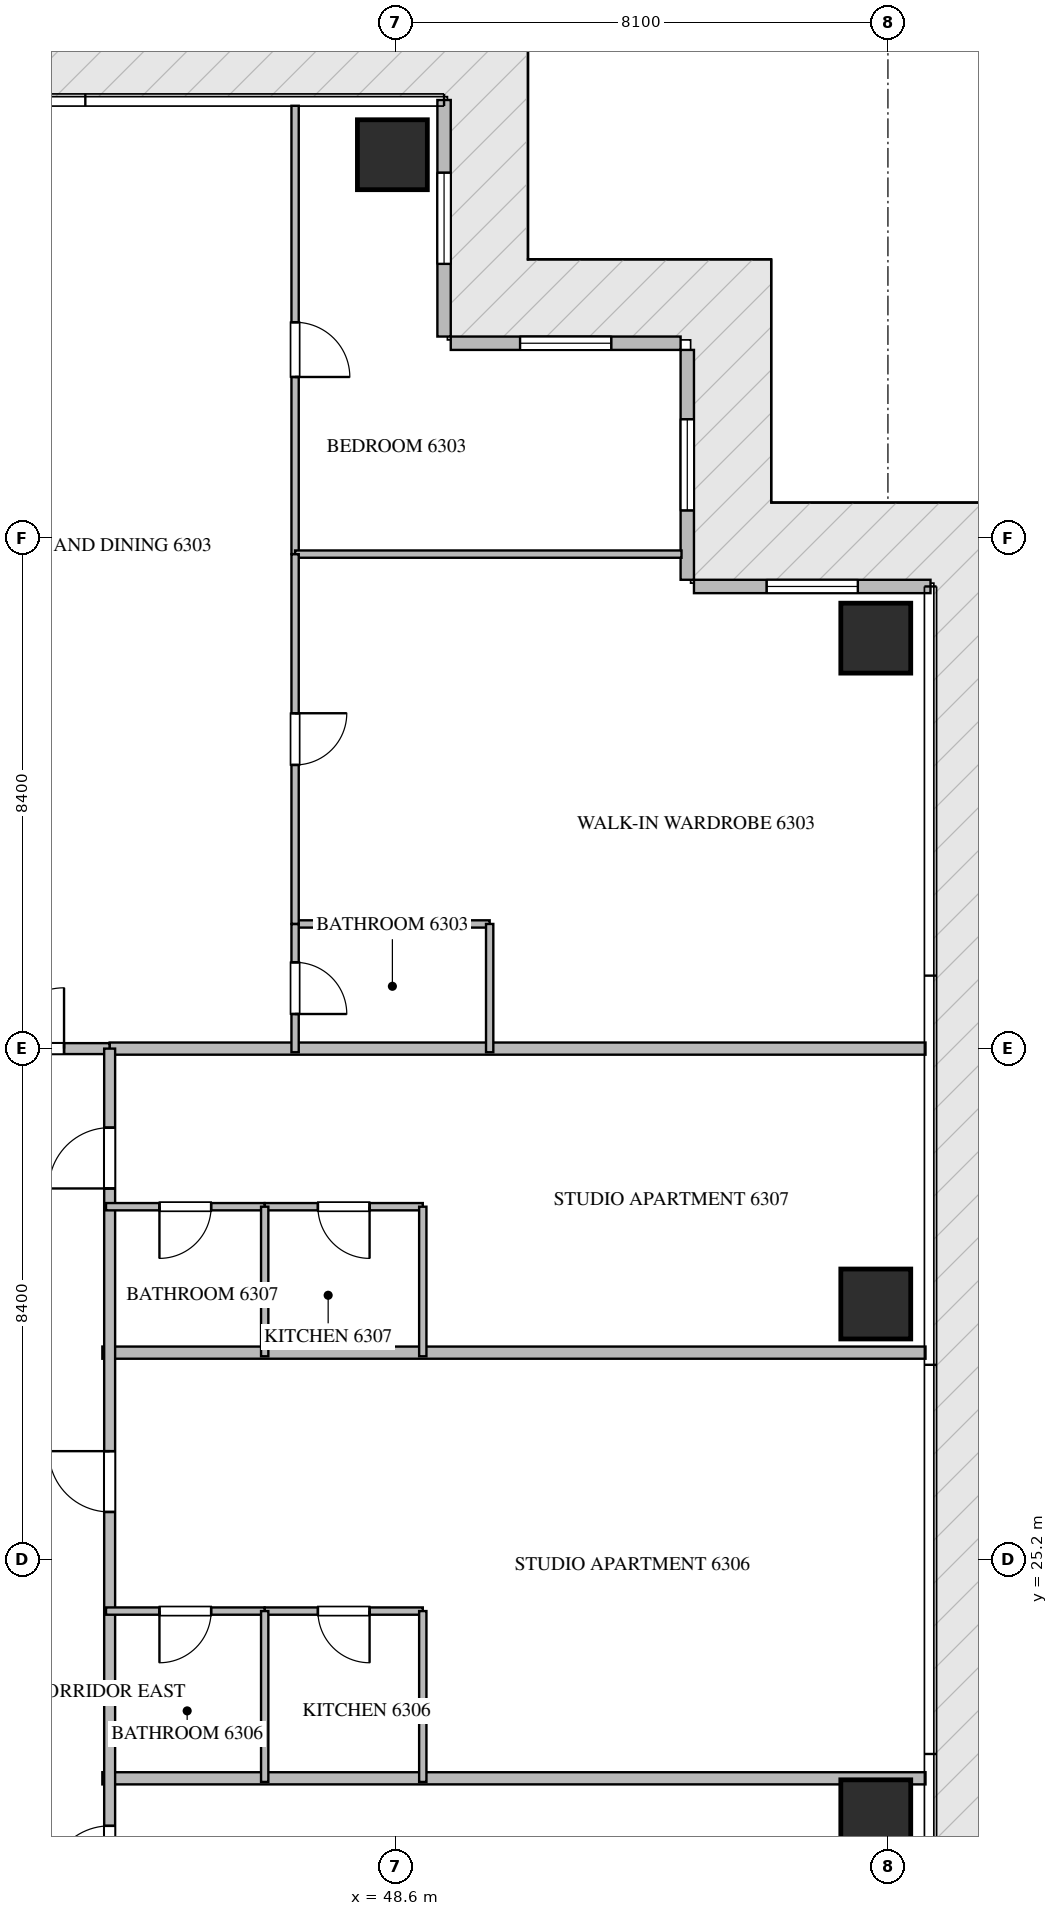
"""IFC4 building model, lengths in metres.
Left out: names, types, materials, properties, quantities, classifications, styles, units other than length and angle.
Written with IfcOpenShell. Run it as: python <this file> out.ifc"""

import sys

from ifc_helpers import new_model, si_unit, direction, frame, frame_2d, origin, origin_2d, place, context, subcontext, project, spatial, rectangle, extrude, source, transform, mapped, element, fill, save


model = new_model("IFC4")
c1 = context("Model", 3, precision=1e-05, world=origin(), true_north=direction((0.0, 1.0)))
c2 = subcontext(c1, "Body", "Model", "MODEL_VIEW")
j1 = project(units=[si_unit("LENGTHUNIT", "METRE"), si_unit("PLANEANGLEUNIT", "RADIAN")], contexts=[c1])
p1 = place(None, origin())
s1 = spatial("IfcSite", under=j1, at=p1, CompositionType="ELEMENT")
p2 = place(p1, origin())
s2 = spatial("IfcBuilding", under=s1, at=p2, CompositionType="ELEMENT")
p3 = place(p2, frame((0.0, 0.0, 252.8)))
s3 = spatial("IfcBuildingStorey", under=s2, at=p3, CompositionType="ELEMENT", Elevation=252.8)
m1 = source(origin(), c2, "Body", "SweptSolid", [
    extrude(rectangle(XDim=1.15, YDim=1.15, at=origin_2d()), origin(), (0.0, 0.0, 1.0), 3.85),
])
for number, where, z_axis, x_axis in (
    (1, (48.55, 48.3, -0.26), (0.0, 0.0, 1.0), (1.0, 0.0, 0.0)),
    (2, (56.5, 21.0, -0.26), (0.0, 0.0, 1.0), (1.0, 0.0, 0.0)),
    (3, (56.5, 29.4, -0.26), (0.0, 0.0, 1.0), (1.0, 0.0, 0.0)),
    (4, (56.5, 40.35, -0.26), (0.0, 0.0, 1.0), (1.0, 0.0, 0.0)),
):
    element("IfcColumn", number, at=place(p3, frame(where, z_axis=z_axis, x_axis=x_axis)), inside=s3, PredefinedType="COLUMN", context=c2, shape_type="MappedRepresentation", body=[
        mapped(m1, transform((0.0, 0.0, 0.0), scale=1.0)),
    ])
p4 = place(p3, frame((57.4, 41.2, 0.0), z_axis=(0.0, 0.0, 1.0), x_axis=(-1.0, 0.0, 0.0)))
e5 = element("IfcWall", 5, at=p4, inside=s3, PredefinedType="ELEMENTEDWALL", context=c2, shape_type="SweptSolid", body=[
    extrude(rectangle(XDim=3.89, YDim=0.22, at=frame_2d((1.945, 0.0))), origin(), (0.0, 0.0, 1.0), 3.575),
])
p5 = place(p4, frame((1.195, 0.0, 0.65)))
e6 = element("IfcOpeningElement", 6, at=p5, cuts=e5, PredefinedType="OPENING", context=c2, shape_type="SweptSolid", body=[
    extrude(rectangle(XDim=1.5, YDim=2.25, at=frame_2d((0.75, 1.125))), frame((0.0, 0.12, 0.0), z_axis=(0.0, -1.0, 0.0), x_axis=(1.0, 0.0, 0.0)), (0.0, 0.0, 1.0), 0.24),
])
p6 = place(p3, frame((53.4, 41.31, 0.0), z_axis=(0.0, 0.0, 1.0), x_axis=(0.0, 1.0, 0.0)))
e7 = element("IfcWall", 7, at=p6, inside=s3, PredefinedType="ELEMENTEDWALL", context=c2, shape_type="SweptSolid", body=[
    extrude(rectangle(XDim=3.78, YDim=0.22, at=frame_2d((1.89, 0.0))), origin(), (0.0, 0.0, 1.0), 3.575),
])
p7 = place(p6, frame((1.14, 0.0, 0.65)))
e8 = element("IfcOpeningElement", 8, at=p7, cuts=e7, PredefinedType="OPENING", context=c2, shape_type="SweptSolid", body=[
    extrude(rectangle(XDim=1.5, YDim=2.25, at=frame_2d((0.75, 1.125))), frame((0.0, 0.12, 0.0), z_axis=(0.0, -1.0, 0.0), x_axis=(1.0, 0.0, 0.0)), (0.0, 0.0, 1.0), 0.24),
])
p8 = place(p3, frame((53.29, 45.2, 0.0), z_axis=(0.0, 0.0, 1.0), x_axis=(-1.0, 0.0, 0.0)))
e9 = element("IfcWall", 9, at=p8, inside=s3, PredefinedType="ELEMENTEDWALL", context=c2, shape_type="SweptSolid", body=[
    extrude(rectangle(XDim=3.78, YDim=0.22, at=frame_2d((1.89, 0.0))), origin(), (0.0, 0.0, 1.0), 3.575),
])
p9 = place(p8, frame((1.14, 0.0, 0.65)))
e10 = element("IfcOpeningElement", 10, at=p9, cuts=e9, PredefinedType="OPENING", context=c2, shape_type="SweptSolid", body=[
    extrude(rectangle(XDim=1.5, YDim=2.25, at=frame_2d((0.75, 1.125))), frame((0.0, 0.12, 0.0), z_axis=(0.0, -1.0, 0.0), x_axis=(1.0, 0.0, 0.0)), (0.0, 0.0, 1.0), 0.24),
])
p10 = place(p3, frame((49.4, 45.31, 0.0), z_axis=(0.0, 0.0, 1.0), x_axis=(0.0, 1.0, 0.0)))
e11 = element("IfcWall", 11, at=p10, inside=s3, PredefinedType="ELEMENTEDWALL", context=c2, shape_type="SweptSolid", body=[
    extrude(rectangle(XDim=3.89, YDim=0.22, at=frame_2d((1.945, 0.0))), origin(), (0.0, 0.0, 1.0), 3.575),
])
p11 = place(p10, frame((1.195, 0.0, 0.65)))
e12 = element("IfcOpeningElement", 12, at=p11, cuts=e11, PredefinedType="OPENING", context=c2, shape_type="SweptSolid", body=[
    extrude(rectangle(XDim=1.5, YDim=2.25, at=frame_2d((0.75, 1.125))), frame((0.0, 0.12, 0.0), z_axis=(0.0, -1.0, 0.0), x_axis=(1.0, 0.0, 0.0)), (0.0, 0.0, 1.0), 0.24),
])
for number, where, z_axis, x_axis in (
    (13, (43.78, 21.6, 0.0), (0.0, 0.0, 1.0), (1.0, 0.0, 0.0)),
    (14, (43.78, 28.6, 0.0), (0.0, 0.0, 1.0), (1.0, 0.0, 0.0)),
):
    element("IfcWall", number, at=place(p3, frame(where, z_axis=z_axis, x_axis=x_axis)), inside=s3, PredefinedType="PARTITIONING", context=c2, shape_type="SweptSolid", body=[
        extrude(rectangle(XDim=13.538, YDim=0.2, at=frame_2d((6.769, 0.0))), origin(), (0.0, 0.0, 1.0), 3.59),
    ])
p12 = place(p3, frame((43.9, 33.6, 0.0), z_axis=(0.0, 0.0, 1.0), x_axis=(1.0, 0.0, 0.0)))
e15 = element("IfcWall", 15, at=p12, inside=s3, PredefinedType="PARTITIONING", context=c2, shape_type="SweptSolid", body=[
    extrude(rectangle(XDim=13.418, YDim=0.2, at=frame_2d((6.709, 0.0))), origin(), (0.0, 0.0, 1.0), 3.59),
])
p13 = place(p3, frame((41.402, 33.6, 0.0), z_axis=(0.0, 0.0, 1.0), x_axis=(1.0, 0.0, 0.0)))
e16 = element("IfcWall", 16, at=p13, inside=s3, PredefinedType="PARTITIONING", context=c2, shape_type="SweptSolid", body=[
    extrude(rectangle(XDim=2.496, YDim=0.18, at=frame_2d((1.248, 0.0))), origin(), (0.0, 0.0, 1.0), 3.59),
])
p14 = place(p13, frame((0.748, 0.0, 0.0)))
e17 = element("IfcOpeningElement", 17, at=p14, cuts=e16, PredefinedType="OPENING", context=c2, shape_type="SweptSolid", body=[
    extrude(rectangle(XDim=1.0, YDim=2.15, at=frame_2d((0.5, 1.075))), frame((0.0, 0.1, 0.0), z_axis=(0.0, -1.0, 0.0), x_axis=(1.0, 0.0, 0.0)), (0.0, 0.0, 1.0), 0.2),
])
p15 = place(p3, frame((43.9, 16.8, 0.0), z_axis=(0.0, 0.0, 1.0), x_axis=(0.0, 1.0, 0.0)))
e18 = element("IfcWall", 18, at=p15, inside=s3, PredefinedType="PARTITIONING", context=c2, shape_type="SweptSolid", body=[
    extrude(rectangle(XDim=16.8, YDim=0.18, at=frame_2d((8.4, 0.0))), origin(), (0.0, 0.0, 1.0), 3.59),
])
p16 = place(p15, frame((3.018, 0.0, 0.0)))
e19 = element("IfcOpeningElement", 19, at=p16, cuts=e18, PredefinedType="OPENING", context=c2, shape_type="SweptSolid", body=[
    extrude(rectangle(XDim=1.0, YDim=2.15, at=frame_2d((0.5, 1.075))), frame((0.0, 0.1, 0.0), z_axis=(0.0, -1.0, 0.0), x_axis=(1.0, 0.0, 0.0)), (0.0, 0.0, 1.0), 0.2),
])
p17 = place(p15, frame((9.18, 0.0, 0.0)))
e20 = element("IfcOpeningElement", 20, at=p17, cuts=e18, PredefinedType="OPENING", context=c2, shape_type="SweptSolid", body=[
    extrude(rectangle(XDim=1.0, YDim=2.15, at=frame_2d((0.5, 1.075))), frame((0.0, 0.1, 0.0), z_axis=(0.0, -1.0, 0.0), x_axis=(1.0, 0.0, 0.0)), (0.0, 0.0, 1.0), 0.2),
])
p18 = place(p15, frame((14.5, 0.0, 0.0)))
e21 = element("IfcOpeningElement", 21, at=p18, cuts=e18, PredefinedType="OPENING", context=c2, shape_type="SweptSolid", body=[
    extrude(rectangle(XDim=1.0, YDim=2.15, at=frame_2d((0.5, 1.075))), frame((0.0, 0.1, 0.0), z_axis=(0.0, -1.0, 0.0), x_axis=(1.0, 0.0, 0.0)), (0.0, 0.0, 1.0), 0.2),
])
p19 = place(p3, frame((46.95, 49.105, 0.0), z_axis=(0.0, 0.0, 1.0), x_axis=(0.0, -1.0, 0.0)))
e22 = element("IfcWall", 22, at=p19, inside=s3, PredefinedType="PARTITIONING", context=c2, shape_type="SweptSolid", body=[
    extrude(rectangle(XDim=7.373, YDim=0.12, at=frame_2d((3.687, 0.0))), origin(), (0.0, 0.0, 1.0), 3.59),
])
p20 = place(p19, frame((3.56, 0.0, 0.0)))
e23 = element("IfcOpeningElement", 23, at=p20, cuts=e22, PredefinedType="OPENING", context=c2, shape_type="SweptSolid", body=[
    extrude(rectangle(XDim=0.9, YDim=2.1, at=frame_2d((0.45, 1.05))), frame((0.0, 0.07, 0.0), z_axis=(0.0, -1.0, 0.0), x_axis=(1.0, 0.0, 0.0)), (0.0, 0.0, 1.0), 0.14),
])
p21 = place(p3, frame((46.95, 41.732, 0.0), z_axis=(0.0, 0.0, 1.0), x_axis=(1.0, 0.0, 0.0)))
e24 = element("IfcWall", 24, at=p21, inside=s3, PredefinedType="PARTITIONING", context=c2, shape_type="SweptSolid", body=[
    extrude(rectangle(XDim=6.355, YDim=0.12, at=frame_2d((3.177, 0.0))), origin(), (0.0, 0.0, 1.0), 3.59),
])
p22 = place(p3, frame((46.95, 35.65, 0.0), z_axis=(0.0, 0.0, 1.0), x_axis=(1.0, 0.0, 0.0)))
e25 = element("IfcWall", 25, at=p22, inside=s3, PredefinedType="PARTITIONING", context=c2, shape_type="SweptSolid", body=[
    extrude(rectangle(XDim=3.2, YDim=0.12, at=frame_2d((1.6, 0.0))), origin(), (0.0, 0.0, 1.0), 3.59),
])
p23 = place(p3, frame((50.15, 35.65, 0.0), z_axis=(0.0, 0.0, 1.0), x_axis=(0.0, -1.0, 0.0)))
e26 = element("IfcWall", 26, at=p23, inside=s3, PredefinedType="PARTITIONING", context=c2, shape_type="SweptSolid", body=[
    extrude(rectangle(XDim=2.11, YDim=0.12, at=frame_2d((1.055, 0.0))), origin(), (0.0, 0.0, 1.0), 3.59),
])
p24 = place(p3, frame((46.95, 41.73, 0.0), z_axis=(0.0, 0.0, 1.0), x_axis=(0.0, -1.0, 0.0)))
e27 = element("IfcWall", 27, at=p24, inside=s3, PredefinedType="PARTITIONING", context=c2, shape_type="SweptSolid", body=[
    extrude(rectangle(XDim=6.08, YDim=0.12, at=frame_2d((3.04, 0.0))), origin(), (0.0, 0.0, 1.0), 3.59),
])
p25 = place(p24, frame((2.615, 0.0, 0.0)))
e28 = element("IfcOpeningElement", 28, at=p25, cuts=e27, PredefinedType="OPENING", context=c2, shape_type="SweptSolid", body=[
    extrude(rectangle(XDim=0.85, YDim=2.1, at=frame_2d((0.425, 1.05))), frame((0.0, 0.07, 0.0), z_axis=(0.0, -1.0, 0.0), x_axis=(1.0, 0.0, 0.0)), (0.0, 0.0, 1.0), 0.14),
])
p26 = place(p3, frame((46.95, 35.648, 0.0), z_axis=(0.0, 0.0, 1.0), x_axis=(0.0, -1.0, 0.0)))
e29 = element("IfcWall", 29, at=p26, inside=s3, PredefinedType="PARTITIONING", context=c2, shape_type="SweptSolid", body=[
    extrude(rectangle(XDim=2.108, YDim=0.12, at=frame_2d((1.054, 0.0))), origin(), (0.0, 0.0, 1.0), 3.59),
])
p27 = place(p26, frame((0.629, 0.0, 0.0)))
e30 = element("IfcOpeningElement", 30, at=p27, cuts=e29, PredefinedType="OPENING", context=c2, shape_type="SweptSolid", body=[
    extrude(rectangle(XDim=0.85, YDim=2.1, at=frame_2d((0.425, 1.05))), frame((0.0, 0.07, 0.0), z_axis=(0.0, -1.0, 0.0), x_axis=(1.0, 0.0, 0.0)), (0.0, 0.0, 1.0), 0.14),
])
p28 = place(p3, frame((49.05, 24.35, 0.0), z_axis=(0.0, 0.0, 1.0), x_axis=(-1.0, 0.0, 0.0)))
e31 = element("IfcWall", 31, at=p28, inside=s3, PredefinedType="PARTITIONING", context=c2, shape_type="SweptSolid", body=[
    extrude(rectangle(XDim=2.6, YDim=0.12, at=frame_2d((1.3, 0.0))), origin(), (0.0, 0.0, 1.0), 3.59),
])
p29 = place(p28, frame((0.875, 0.0, 0.0)))
e32 = element("IfcOpeningElement", 32, at=p29, cuts=e31, PredefinedType="OPENING", context=c2, shape_type="SweptSolid", body=[
    extrude(rectangle(XDim=0.85, YDim=2.1, at=frame_2d((0.425, 1.05))), frame((0.0, 0.07, 0.0), z_axis=(0.0, -1.0, 0.0), x_axis=(1.0, 0.0, 0.0)), (0.0, 0.0, 1.0), 0.14),
])
p30 = place(p3, frame((46.448, 24.35, 0.0), z_axis=(0.0, 0.0, 1.0), x_axis=(-1.0, 0.0, 0.0)))
e33 = element("IfcWall", 33, at=p30, inside=s3, PredefinedType="PARTITIONING", context=c2, shape_type="SweptSolid", body=[
    extrude(rectangle(XDim=2.608, YDim=0.12, at=frame_2d((1.304, 0.0))), origin(), (0.0, 0.0, 1.0), 3.59),
])
p31 = place(p30, frame((0.879, 0.0, 0.0)))
e34 = element("IfcOpeningElement", 34, at=p31, cuts=e33, PredefinedType="OPENING", context=c2, shape_type="SweptSolid", body=[
    extrude(rectangle(XDim=0.85, YDim=2.1, at=frame_2d((0.425, 1.05))), frame((0.0, 0.07, 0.0), z_axis=(0.0, -1.0, 0.0), x_axis=(1.0, 0.0, 0.0)), (0.0, 0.0, 1.0), 0.14),
])
for number, where, z_axis, x_axis in (
    (35, (46.45, 21.54, 0.0), (0.0, 0.0, 1.0), (0.0, 1.0, 0.0)),
    (36, (49.05, 21.54, 0.0), (0.0, 0.0, 1.0), (0.0, 1.0, 0.0)),
):
    element("IfcWall", number, at=place(p3, frame(where, z_axis=z_axis, x_axis=x_axis)), inside=s3, PredefinedType="PARTITIONING", context=c2, shape_type="SweptSolid", body=[
        extrude(rectangle(XDim=2.81, YDim=0.12, at=frame_2d((1.405, 0.0))), origin(), (0.0, 0.0, 1.0), 3.59),
    ])
p32 = place(p3, frame((49.05, 31.0, 0.0), z_axis=(0.0, 0.0, 1.0), x_axis=(-1.0, 0.0, 0.0)))
e37 = element("IfcWall", 37, at=p32, inside=s3, PredefinedType="PARTITIONING", context=c2, shape_type="SweptSolid", body=[
    extrude(rectangle(XDim=2.6, YDim=0.12, at=frame_2d((1.3, 0.0))), origin(), (0.0, 0.0, 1.0), 3.59),
])
p33 = place(p32, frame((0.875, 0.0, 0.0)))
e38 = element("IfcOpeningElement", 38, at=p33, cuts=e37, PredefinedType="OPENING", context=c2, shape_type="SweptSolid", body=[
    extrude(rectangle(XDim=0.85, YDim=2.1, at=frame_2d((0.425, 1.05))), frame((0.0, 0.07, 0.0), z_axis=(0.0, -1.0, 0.0), x_axis=(1.0, 0.0, 0.0)), (0.0, 0.0, 1.0), 0.14),
])
p34 = place(p3, frame((46.448, 31.0, 0.0), z_axis=(0.0, 0.0, 1.0), x_axis=(-1.0, 0.0, 0.0)))
e39 = element("IfcWall", 39, at=p34, inside=s3, PredefinedType="PARTITIONING", context=c2, shape_type="SweptSolid", body=[
    extrude(rectangle(XDim=2.608, YDim=0.12, at=frame_2d((1.304, 0.0))), origin(), (0.0, 0.0, 1.0), 3.59),
])
p35 = place(p34, frame((0.879, 0.0, 0.0)))
e40 = element("IfcOpeningElement", 40, at=p35, cuts=e39, PredefinedType="OPENING", context=c2, shape_type="SweptSolid", body=[
    extrude(rectangle(XDim=0.85, YDim=2.1, at=frame_2d((0.425, 1.05))), frame((0.0, 0.07, 0.0), z_axis=(0.0, -1.0, 0.0), x_axis=(1.0, 0.0, 0.0)), (0.0, 0.0, 1.0), 0.14),
])
for number, where, z_axis, x_axis in (
    (41, (46.45, 28.54, 0.0), (0.0, 0.0, 1.0), (0.0, 1.0, 0.0)),
    (42, (49.05, 28.54, 0.0), (0.0, 0.0, 1.0), (0.0, 1.0, 0.0)),
):
    element("IfcWall", number, at=place(p3, frame(where, z_axis=z_axis, x_axis=x_axis)), inside=s3, PredefinedType="PARTITIONING", context=c2, shape_type="SweptSolid", body=[
        extrude(rectangle(XDim=2.46, YDim=0.12, at=frame_2d((1.23, 0.0))), origin(), (0.0, 0.0, 1.0), 3.59),
    ])
m2 = source(origin(), c2, "Body", "SweptSolid", [
    extrude(rectangle(XDim=1.5, YDim=2.25, at=frame_2d((0.75, 1.125))), frame((0.0, 0.03, 0.0), z_axis=(0.0, -1.0, 0.0), x_axis=(1.0, 0.0, 0.0)), (0.0, 0.0, 1.0), 0.06),
])
p36 = place(p5, origin())
e43 = element("IfcWindow", 43, at=p36, inside=s3, PartitioningType="SINGLE_PANEL", PredefinedType="WINDOW", context=c2, shape_type="MappedRepresentation", body=[
    mapped(m2, transform((0.0, 0.0, 0.0), scale=1.0)),
])
fill(e6, e43)
p37 = place(p7, origin())
e44 = element("IfcWindow", 44, at=p37, inside=s3, PartitioningType="SINGLE_PANEL", PredefinedType="WINDOW", context=c2, shape_type="MappedRepresentation", body=[
    mapped(m2, transform((0.0, 0.0, 0.0), scale=1.0)),
])
fill(e8, e44)
p38 = place(p9, origin())
e45 = element("IfcWindow", 45, at=p38, inside=s3, PartitioningType="SINGLE_PANEL", PredefinedType="WINDOW", context=c2, shape_type="MappedRepresentation", body=[
    mapped(m2, transform((0.0, 0.0, 0.0), scale=1.0)),
])
fill(e10, e45)
p39 = place(p11, origin())
e46 = element("IfcWindow", 46, at=p39, inside=s3, PartitioningType="SINGLE_PANEL", PredefinedType="WINDOW", context=c2, shape_type="MappedRepresentation", body=[
    mapped(m2, transform((0.0, 0.0, 0.0), scale=1.0)),
])
fill(e12, e46)
m3 = source(origin(), c2, "Body", "SweptSolid", [
    extrude(rectangle(XDim=1.0, YDim=2.15, at=frame_2d((0.5, 1.075))), frame((0.0, 0.025, 0.0), z_axis=(0.0, -1.0, 0.0), x_axis=(1.0, 0.0, 0.0)), (0.0, 0.0, 1.0), 0.05),
])
p40 = place(p14, origin())
e47 = element("IfcDoor", 47, at=p40, inside=s3, OperationType="SINGLE_SWING_RIGHT", PredefinedType="DOOR", context=c2, shape_type="MappedRepresentation", body=[
    mapped(m3, transform((0.0, 0.0, 0.0), scale=1.0)),
])
fill(e17, e47)
p41 = place(p16, origin())
e48 = element("IfcDoor", 48, at=p41, inside=s3, OperationType="SINGLE_SWING_LEFT", PredefinedType="DOOR", context=c2, shape_type="MappedRepresentation", body=[
    mapped(m3, transform((0.0, 0.0, 0.0), scale=1.0)),
])
fill(e19, e48)
p42 = place(p17, origin())
e49 = element("IfcDoor", 49, at=p42, inside=s3, OperationType="SINGLE_SWING_RIGHT", PredefinedType="DOOR", context=c2, shape_type="MappedRepresentation", body=[
    mapped(m3, transform((0.0, 0.0, 0.0), scale=1.0)),
])
fill(e20, e49)
p43 = place(p18, origin())
e50 = element("IfcDoor", 50, at=p43, inside=s3, OperationType="SINGLE_SWING_LEFT", PredefinedType="DOOR", context=c2, shape_type="MappedRepresentation", body=[
    mapped(m3, transform((0.0, 0.0, 0.0), scale=1.0)),
])
fill(e21, e50)
m4 = source(origin(), c2, "Body", "SweptSolid", [
    extrude(rectangle(XDim=0.9, YDim=2.1, at=frame_2d((0.45, 1.05))), frame((0.0, 0.025, 0.0), z_axis=(0.0, -1.0, 0.0), x_axis=(1.0, 0.0, 0.0)), (0.0, 0.0, 1.0), 0.05),
])
p44 = place(p20, origin())
e51 = element("IfcDoor", 51, at=p44, inside=s3, OperationType="SINGLE_SWING_RIGHT", PredefinedType="DOOR", context=c2, shape_type="MappedRepresentation", body=[
    mapped(m4, transform((0.0, 0.0, 0.0), scale=1.0)),
])
fill(e23, e51)
m5 = source(origin(), c2, "Body", "SweptSolid", [
    extrude(rectangle(XDim=0.85, YDim=2.1, at=frame_2d((0.425, 1.05))), frame((0.0, 0.025, 0.0), z_axis=(0.0, -1.0, 0.0), x_axis=(1.0, 0.0, 0.0)), (0.0, 0.0, 1.0), 0.05),
])
p45 = place(p25, origin())
e52 = element("IfcDoor", 52, at=p45, inside=s3, OperationType="SINGLE_SWING_LEFT", PredefinedType="DOOR", context=c2, shape_type="MappedRepresentation", body=[
    mapped(m5, transform((0.0, 0.0, 0.0), scale=1.0)),
])
fill(e28, e52)
p46 = place(p27, origin())
e53 = element("IfcDoor", 53, at=p46, inside=s3, OperationType="SINGLE_SWING_RIGHT", PredefinedType="DOOR", context=c2, shape_type="MappedRepresentation", body=[
    mapped(m5, transform((0.0, 0.0, 0.0), scale=1.0)),
])
fill(e30, e53)
p47 = place(p29, origin())
e54 = element("IfcDoor", 54, at=p47, inside=s3, OperationType="SINGLE_SWING_LEFT", PredefinedType="DOOR", context=c2, shape_type="MappedRepresentation", body=[
    mapped(m5, transform((0.0, 0.0, 0.0), scale=1.0)),
])
fill(e32, e54)
p48 = place(p31, origin())
e55 = element("IfcDoor", 55, at=p48, inside=s3, OperationType="SINGLE_SWING_RIGHT", PredefinedType="DOOR", context=c2, shape_type="MappedRepresentation", body=[
    mapped(m5, transform((0.0, 0.0, 0.0), scale=1.0)),
])
fill(e34, e55)
p49 = place(p33, origin())
e56 = element("IfcDoor", 56, at=p49, inside=s3, OperationType="SINGLE_SWING_LEFT", PredefinedType="DOOR", context=c2, shape_type="MappedRepresentation", body=[
    mapped(m5, transform((0.0, 0.0, 0.0), scale=1.0)),
])
fill(e38, e56)
p50 = place(p35, origin())
e57 = element("IfcDoor", 57, at=p50, inside=s3, OperationType="SINGLE_SWING_RIGHT", PredefinedType="DOOR", context=c2, shape_type="MappedRepresentation", body=[
    mapped(m5, transform((0.0, 0.0, 0.0), scale=1.0)),
])
fill(e40, e57)
save(model, sys.argv[1])
